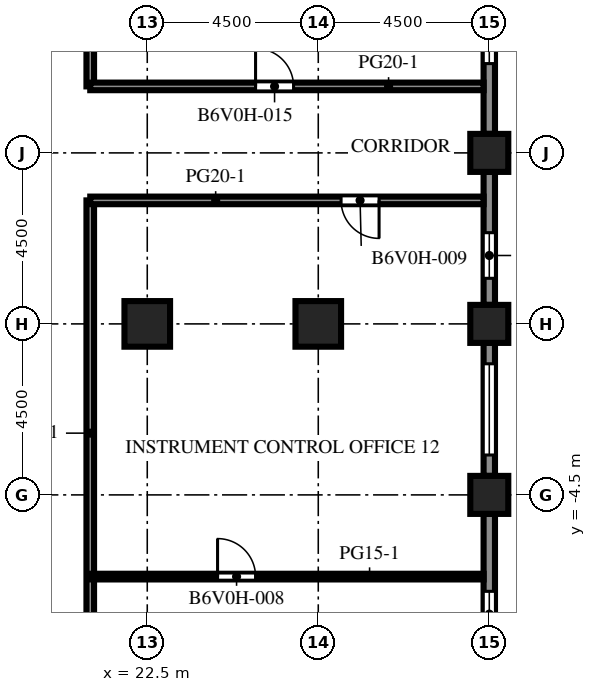
"""IFC4 building model, lengths in metres.
Left out: names, types, materials, properties, quantities, classifications, styles, units other than length and angle.
Written with IfcOpenShell. Run it as: python <this file> out.ifc"""

import sys

from ifc_helpers import new_model, si_unit, direction, frame, frame_2d, origin, origin_2d, place, context, subcontext, project, spatial, rectangle, extrude, element, fill, save


model = new_model("IFC4")
c1 = context("Model", 3, precision=1e-05, world=origin(), true_north=direction((0.0, 1.0)))
c2 = subcontext(c1, "Body", "Model", "MODEL_VIEW")
j1 = project(units=[si_unit("LENGTHUNIT", "METRE"), si_unit("PLANEANGLEUNIT", "RADIAN")], contexts=[c1])
p1 = place(None, origin())
s1 = spatial("IfcSite", under=j1, at=p1, CompositionType="ELEMENT")
p2 = place(p1, origin())
s2 = spatial("IfcBuilding", under=s1, at=p2, CompositionType="ELEMENT")
p3 = place(p2, frame((0.0, 0.0, 191.5)))
s3 = spatial("IfcBuildingStorey", under=s2, at=p3, CompositionType="ELEMENT", Elevation=191.5)
for number, where, z_axis, x_axis in (
    (1, (31.5, -4.5, -0.45), (0.0, 0.0, 1.0), (1.0, 0.0, 0.0)),
    (2, (31.5, 0.0, -0.45), (0.0, 0.0, 1.0), (1.0, 0.0, 0.0)),
    (3, (31.5, 4.5, -0.45), (0.0, 0.0, 1.0), (1.0, 0.0, 0.0)),
):
    element("IfcColumn", number, at=place(p3, frame(where, z_axis=z_axis, x_axis=x_axis)), inside=s3, PredefinedType="COLUMN", context=c2, shape_type="SweptSolid", body=[
        extrude(rectangle(XDim=1.0, YDim=1.0, at=origin_2d()), origin(), (0.0, 0.0, 1.0), 4.55),
    ])
for number, where, z_axis, x_axis in (
    (4, (22.5, 0.0, -0.45), (0.0, 0.0, 1.0), (1.0, 0.0, 0.0)),
    (5, (27.0, 0.0, -0.45), (0.0, 0.0, 1.0), (1.0, 0.0, 0.0)),
):
    element("IfcColumn", number, at=place(p3, frame(where, z_axis=z_axis, x_axis=x_axis)), inside=s3, PredefinedType="COLUMN", context=c2, shape_type="SweptSolid", body=[
        extrude(rectangle(XDim=1.2, YDim=1.2, at=origin_2d()), origin(), (0.0, 0.0, 1.0), 4.55),
    ])
p4 = place(p3, frame((31.5, -5.0, 0.0), z_axis=(0.0, 0.0, 1.0), x_axis=(0.0, -1.0, 0.0)))
e6 = element("IfcWall", 6, at=p4, inside=s3, PredefinedType="SOLIDWALL", context=c2, shape_type="SweptSolid", body=[
    extrude(rectangle(XDim=3.5, YDim=0.3, at=frame_2d((1.75, 0.0))), origin(), (0.0, 0.0, 1.0), 2.85),
])
p5 = place(p4, frame((2.038, 0.0, 0.8)))
e7 = element("IfcOpeningElement", 7, at=p5, cuts=e6, PredefinedType="OPENING", context=c2, shape_type="SweptSolid", body=[
    extrude(rectangle(XDim=1.2, YDim=1.7, at=frame_2d((0.6, 0.85))), frame((0.0, 0.16, 0.0), z_axis=(0.0, -1.0, 0.0), x_axis=(1.0, 0.0, 0.0)), (0.0, 0.0, 1.0), 0.32),
])
p6 = place(p3, frame((31.5, -0.5, 0.0), z_axis=(0.0, 0.0, 1.0), x_axis=(0.0, -1.0, 0.0)))
e8 = element("IfcWall", 8, at=p6, inside=s3, PredefinedType="SOLIDWALL", context=c2, shape_type="SweptSolid", body=[
    extrude(rectangle(XDim=3.5, YDim=0.3, at=frame_2d((1.75, 0.0))), origin(), (0.0, 0.0, 1.0), 2.85),
])
p7 = place(p6, frame((0.55, 0.0, 0.8)))
e9 = element("IfcOpeningElement", 9, at=p7, cuts=e8, PredefinedType="OPENING", context=c2, shape_type="SweptSolid", body=[
    extrude(rectangle(XDim=2.4, YDim=1.7, at=frame_2d((1.2, 0.85))), frame((0.0, 0.16, 0.0), z_axis=(0.0, -1.0, 0.0), x_axis=(1.0, 0.0, 0.0)), (0.0, 0.0, 1.0), 0.32),
])
p8 = place(p3, frame((31.5, 4.0, 0.0), z_axis=(0.0, 0.0, 1.0), x_axis=(0.0, -1.0, 0.0)))
e10 = element("IfcWall", 10, at=p8, inside=s3, PredefinedType="SOLIDWALL", context=c2, shape_type="SweptSolid", body=[
    extrude(rectangle(XDim=3.5, YDim=0.3, at=frame_2d((1.75, 0.0))), origin(), (0.0, 0.0, 1.0), 2.85),
])
p9 = place(p8, frame((1.6, 0.0, 0.8)))
e11 = element("IfcOpeningElement", 11, at=p9, cuts=e10, PredefinedType="OPENING", context=c2, shape_type="SweptSolid", body=[
    extrude(rectangle(XDim=1.2, YDim=1.7, at=frame_2d((0.6, 0.85))), frame((0.0, 0.16, 0.0), z_axis=(0.0, -1.0, 0.0), x_axis=(1.0, 0.0, 0.0)), (0.0, 0.0, 1.0), 0.32),
])
p10 = place(p3, frame((31.5, 8.5, 0.0), z_axis=(0.0, 0.0, 1.0), x_axis=(0.0, -1.0, 0.0)))
e12 = element("IfcWall", 12, at=p10, inside=s3, PredefinedType="SOLIDWALL", context=c2, shape_type="SweptSolid", body=[
    extrude(rectangle(XDim=3.5, YDim=0.3, at=frame_2d((1.75, 0.0))), origin(), (0.0, 0.0, 1.0), 2.85),
])
p11 = place(p10, frame((0.45, 0.0, 0.8)))
e13 = element("IfcOpeningElement", 13, at=p11, cuts=e12, PredefinedType="OPENING", context=c2, shape_type="SweptSolid", body=[
    extrude(rectangle(XDim=1.2, YDim=1.7, at=frame_2d((0.6, 0.85))), frame((0.0, 0.16, 0.0), z_axis=(0.0, -1.0, 0.0), x_axis=(1.0, 0.0, 0.0)), (0.0, 0.0, 1.0), 0.32),
])
for number, where, z_axis, x_axis in (
    (14, (21.0, -9.0, 0.0), (0.0, 0.0, 1.0), (0.0, 1.0, 0.0)),
    (15, (21.0, 6.25, 0.0), (0.0, 0.0, 1.0), (0.0, 1.0, 0.0)),
):
    element("IfcWall", number, at=place(p3, frame(where, z_axis=z_axis, x_axis=x_axis)), inside=s3, PredefinedType="PARTITIONING", context=c2, shape_type="SweptSolid", body=[
        extrude(rectangle(XDim=12.25, YDim=0.2, at=frame_2d((6.125, 0.0))), origin(), (0.0, 0.0, 1.0), 3.65),
    ])
p12 = place(p3, frame((31.35, -6.65, 0.0), z_axis=(0.0, 0.0, 1.0), x_axis=(-1.0, 0.0, 0.0)))
e16 = element("IfcWall", 16, at=p12, inside=s3, PredefinedType="PARTITIONING", context=c2, shape_type="SweptSolid", body=[
    extrude(rectangle(XDim=10.35, YDim=0.15, at=frame_2d((5.175, 0.0))), origin(), (0.0, 0.0, 1.0), 3.65),
])
p13 = place(p12, frame((6.0, 0.0, 0.0)))
e17 = element("IfcOpeningElement", 17, at=p13, cuts=e16, PredefinedType="OPENING", context=c2, shape_type="SweptSolid", body=[
    extrude(rectangle(XDim=1.0, YDim=2.1, at=frame_2d((0.5, 1.05))), frame((0.0, 0.085, 0.0), z_axis=(0.0, -1.0, 0.0), x_axis=(1.0, 0.0, 0.0)), (0.0, 0.0, 1.0), 0.17),
])
p14 = place(p3, frame((31.35, 3.25, 0.0), z_axis=(0.0, 0.0, 1.0), x_axis=(-1.0, 0.0, 0.0)))
e18 = element("IfcWall", 18, at=p14, inside=s3, PredefinedType="PARTITIONING", context=c2, shape_type="SweptSolid", body=[
    extrude(rectangle(XDim=10.35, YDim=0.2, at=frame_2d((5.175, 0.0))), origin(), (0.0, 0.0, 1.0), 3.65),
])
p15 = place(p14, frame((2.75, 0.0, 0.0)))
e19 = element("IfcOpeningElement", 19, at=p15, cuts=e18, PredefinedType="OPENING", context=c2, shape_type="SweptSolid", body=[
    extrude(rectangle(XDim=1.0, YDim=2.1, at=frame_2d((0.5, 1.05))), frame((0.0, 0.11, 0.0), z_axis=(0.0, -1.0, 0.0), x_axis=(1.0, 0.0, 0.0)), (0.0, 0.0, 1.0), 0.22),
])
p16 = place(p3, frame((21.0, 6.25, 0.0), z_axis=(0.0, 0.0, 1.0), x_axis=(1.0, 0.0, 0.0)))
e20 = element("IfcWall", 20, at=p16, inside=s3, PredefinedType="PARTITIONING", context=c2, shape_type="SweptSolid", body=[
    extrude(rectangle(XDim=10.35, YDim=0.2, at=frame_2d((5.175, 0.0))), origin(), (0.0, 0.0, 1.0), 3.65),
])
p17 = place(p16, frame((4.35, 0.0, 0.0)))
e21 = element("IfcOpeningElement", 21, at=p17, cuts=e20, PredefinedType="OPENING", context=c2, shape_type="SweptSolid", body=[
    extrude(rectangle(XDim=1.0, YDim=2.1, at=frame_2d((0.5, 1.05))), frame((0.0, 0.11, 0.0), z_axis=(0.0, -1.0, 0.0), x_axis=(1.0, 0.0, 0.0)), (0.0, 0.0, 1.0), 0.22),
])
p18 = place(p5, origin())
e22 = element("IfcWindow", 22, at=p18, inside=s3, PartitioningType="SINGLE_PANEL", PredefinedType="WINDOW", context=c2, shape_type="SweptSolid", body=[
    extrude(rectangle(XDim=1.2, YDim=1.7, at=frame_2d((0.6, 0.85))), frame((0.0, 0.03, 0.0), z_axis=(0.0, -1.0, 0.0), x_axis=(1.0, 0.0, 0.0)), (0.0, 0.0, 1.0), 0.06),
])
fill(e7, e22)
p19 = place(p7, origin())
e23 = element("IfcWindow", 23, at=p19, inside=s3, PartitioningType="SINGLE_PANEL", PredefinedType="WINDOW", context=c2, shape_type="SweptSolid", body=[
    extrude(rectangle(XDim=2.4, YDim=1.7, at=frame_2d((1.2, 0.85))), frame((0.0, 0.03, 0.0), z_axis=(0.0, -1.0, 0.0), x_axis=(1.0, 0.0, 0.0)), (0.0, 0.0, 1.0), 0.06),
])
fill(e9, e23)
p20 = place(p9, origin())
e24 = element("IfcWindow", 24, at=p20, inside=s3, PartitioningType="SINGLE_PANEL", PredefinedType="WINDOW", context=c2, shape_type="SweptSolid", body=[
    extrude(rectangle(XDim=1.2, YDim=1.7, at=frame_2d((0.6, 0.85))), frame((0.0, 0.03, 0.0), z_axis=(0.0, -1.0, 0.0), x_axis=(1.0, 0.0, 0.0)), (0.0, 0.0, 1.0), 0.06),
])
fill(e11, e24)
p21 = place(p11, origin())
e25 = element("IfcWindow", 25, at=p21, inside=s3, PartitioningType="SINGLE_PANEL", PredefinedType="WINDOW", context=c2, shape_type="SweptSolid", body=[
    extrude(rectangle(XDim=1.2, YDim=1.7, at=frame_2d((0.6, 0.85))), frame((0.0, 0.03, 0.0), z_axis=(0.0, -1.0, 0.0), x_axis=(1.0, 0.0, 0.0)), (0.0, 0.0, 1.0), 0.06),
])
fill(e13, e25)
p22 = place(p13, origin())
e26 = element("IfcDoor", 26, at=p22, inside=s3, OperationType="SINGLE_SWING_RIGHT", PredefinedType="DOOR", context=c2, shape_type="SweptSolid", body=[
    extrude(rectangle(XDim=1.0, YDim=2.1, at=frame_2d((0.5, 1.05))), frame((0.0, 0.025, 0.0), z_axis=(0.0, -1.0, 0.0), x_axis=(1.0, 0.0, 0.0)), (0.0, 0.0, 1.0), 0.05),
])
fill(e17, e26)
p23 = place(p15, origin())
e27 = element("IfcDoor", 27, at=p23, inside=s3, OperationType="SINGLE_SWING_LEFT", PredefinedType="DOOR", context=c2, shape_type="SweptSolid", body=[
    extrude(rectangle(XDim=1.0, YDim=2.1, at=frame_2d((0.5, 1.05))), frame((0.0, 0.025, 0.0), z_axis=(0.0, -1.0, 0.0), x_axis=(1.0, 0.0, 0.0)), (0.0, 0.0, 1.0), 0.05),
])
fill(e19, e27)
p24 = place(p17, origin())
e28 = element("IfcDoor", 28, at=p24, inside=s3, OperationType="SINGLE_SWING_LEFT", PredefinedType="DOOR", context=c2, shape_type="SweptSolid", body=[
    extrude(rectangle(XDim=1.0, YDim=2.1, at=frame_2d((0.5, 1.05))), frame((0.0, 0.025, 0.0), z_axis=(0.0, -1.0, 0.0), x_axis=(1.0, 0.0, 0.0)), (0.0, 0.0, 1.0), 0.05),
])
fill(e21, e28)
save(model, sys.argv[1])
